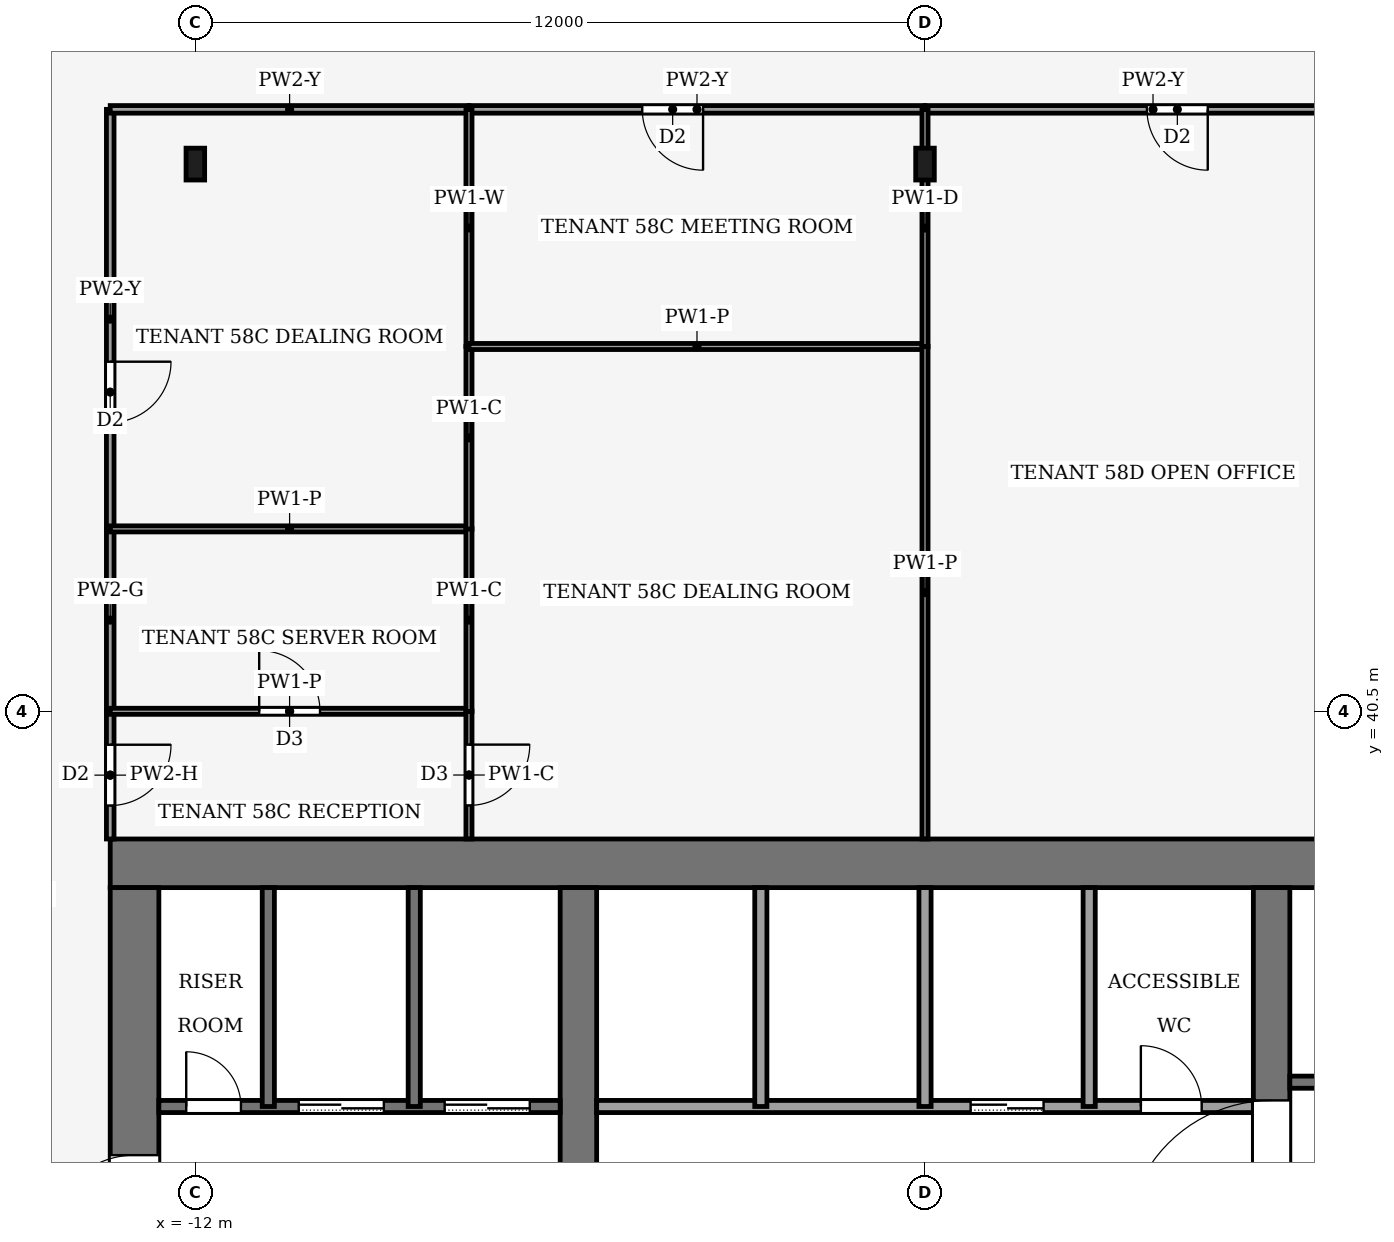
"""IFC4 building model, lengths in metres.
Left out: names, types, materials, properties, quantities, classifications, styles, units other than length and angle.
Written with IfcOpenShell. Run it as: python <this file> out.ifc"""

import sys

from ifc_helpers import new_model, si_unit, direction, frame, frame_2d, origin, origin_2d, place, context, subcontext, project, spatial, rectangle, i_section, extrude, element, fill, save


model = new_model("IFC4")
c1 = context("Model", 3, precision=1e-05, world=origin(), true_north=direction((0.0, 1.0)))
c2 = subcontext(c1, "Body", "Model", "MODEL_VIEW")
j1 = project(units=[si_unit("LENGTHUNIT", "METRE"), si_unit("PLANEANGLEUNIT", "RADIAN")], contexts=[c1])
p1 = place(None, origin())
s1 = spatial("IfcSite", under=j1, at=p1, CompositionType="ELEMENT")
p2 = place(p1, origin())
s2 = spatial("IfcBuilding", under=s1, at=p2, CompositionType="ELEMENT")
p3 = place(p2, frame((0.0, 0.0, 254.0)))
s3 = spatial("IfcBuildingStorey", under=s2, at=p3, CompositionType="ELEMENT", Elevation=254.0)
p4 = place(p3, frame((-13.4, 38.0, -0.13), z_axis=(0.0, 0.0, 1.0), x_axis=(1.0, 0.0, 0.0)))
e1 = element("IfcWall", 1, at=p4, inside=s3, PredefinedType="SHEAR", context=c2, shape_type="SweptSolid", body=[
    extrude(rectangle(XDim=26.8, YDim=0.8, at=frame_2d((13.4, 0.0))), origin(), (0.0, 0.0, 1.0), 4.0),
])
p5 = place(p3, frame((-13.0, 18.4, -0.13), z_axis=(0.0, 0.0, 1.0), x_axis=(0.0, 1.0, 0.0)))
e2 = element("IfcWall", 2, at=p5, inside=s3, PredefinedType="SHEAR", context=c2, shape_type="SweptSolid", body=[
    extrude(rectangle(XDim=19.2, YDim=0.8, at=frame_2d((9.6, 0.0))), origin(), (0.0, 0.0, 1.0), 4.0),
])
p6 = place(p5, frame((2.8, 0.0, 0.13)))
e3 = element("IfcOpeningElement", 3, at=p6, cuts=e2, PredefinedType="OPENING", context=c2, shape_type="SweptSolid", body=[
    extrude(rectangle(XDim=2.4, YDim=2.4, at=frame_2d((1.2, 1.2))), frame((0.0, 0.41, 0.0), z_axis=(0.0, -1.0, 0.0), x_axis=(1.0, 0.0, 0.0)), (0.0, 0.0, 1.0), 0.82),
])
p7 = place(p5, frame((13.4, 0.0, 0.13)))
e4 = element("IfcOpeningElement", 4, at=p7, cuts=e2, PredefinedType="OPENING", context=c2, shape_type="SweptSolid", body=[
    extrude(rectangle(XDim=1.4, YDim=2.2, at=frame_2d((0.7, 1.1))), frame((0.0, 0.41, 0.0), z_axis=(0.0, -1.0, 0.0), x_axis=(1.0, 0.0, 0.0)), (0.0, 0.0, 1.0), 0.82),
])
p8 = place(p3, frame((-5.7, 18.4, -0.13), z_axis=(0.0, 0.0, 1.0), x_axis=(0.0, 1.0, 0.0)))
e5 = element("IfcWall", 5, at=p8, inside=s3, PredefinedType="SHEAR", context=c2, shape_type="SweptSolid", body=[
    extrude(rectangle(XDim=19.2, YDim=0.6, at=frame_2d((9.6, 0.0))), origin(), (0.0, 0.0, 1.0), 4.0),
])
p9 = place(p8, frame((8.35, 0.0, 0.13)))
e6 = element("IfcOpeningElement", 6, at=p9, cuts=e5, PredefinedType="OPENING", context=c2, shape_type="SweptSolid", body=[
    extrude(rectangle(XDim=0.9, YDim=2.1, at=frame_2d((0.45, 1.05))), frame((0.0, 0.31, 0.0), z_axis=(0.0, -1.0, 0.0), x_axis=(1.0, 0.0, 0.0)), (0.0, 0.0, 1.0), 0.62),
])
p10 = place(p3, frame((5.7, 18.4, -0.13), z_axis=(0.0, 0.0, 1.0), x_axis=(0.0, 1.0, 0.0)))
e7 = element("IfcWall", 7, at=p10, inside=s3, PredefinedType="SHEAR", context=c2, shape_type="SweptSolid", body=[
    extrude(rectangle(XDim=19.2, YDim=0.6, at=frame_2d((9.6, 0.0))), origin(), (0.0, 0.0, 1.0), 4.0),
])
p11 = place(p10, frame((13.3, 0.0, 0.13)))
e8 = element("IfcOpeningElement", 8, at=p11, cuts=e7, PredefinedType="OPENING", context=c2, shape_type="SweptSolid", body=[
    extrude(rectangle(XDim=2.4, YDim=2.4, at=frame_2d((1.2, 1.2))), frame((0.0, 0.31, 0.0), z_axis=(0.0, -1.0, 0.0), x_axis=(1.0, 0.0, 0.0)), (0.0, 0.0, 1.0), 0.62),
])
for number, where, z_axis, x_axis in (
    (9, (-12.0, 49.5, 0.0), (0.0, 0.0, 1.0), (1.0, 0.0, 0.0)),
    (10, (0.0, 49.5, 0.0), (0.0, 0.0, 1.0), (1.0, 0.0, 0.0)),
):
    element("IfcColumn", number, at=place(p3, frame(where, z_axis=z_axis, x_axis=x_axis)), inside=s3, PredefinedType="COLUMN", context=c2, shape_type="SweptSolid", body=[
        extrude(i_section(OverallWidth=0.306, OverallDepth=0.524, WebThickness=0.012, FlangeThickness=0.04, FilletRadius=0.027, at=origin_2d()), origin(), (0.0, 0.0, 1.0), 4.0),
    ])
p12 = place(p3, frame((-12.6, 34.0, 0.0), z_axis=(0.0, 0.0, 1.0), x_axis=(1.0, 0.0, 0.0)))
e11 = element("IfcWall", 11, at=p12, inside=s3, PredefinedType="PARTITIONING", context=c2, shape_type="SweptSolid", body=[
    extrude(rectangle(XDim=6.6, YDim=0.2, at=frame_2d((3.3, 0.0))), origin(), (0.0, 0.0, 1.0), 3.87),
])
p13 = place(p12, frame((4.7, 0.0, 0.0)))
e12 = element("IfcOpeningElement", 12, at=p13, cuts=e11, PredefinedType="OPENING", context=c2, shape_type="SweptSolid", body=[
    extrude(rectangle(XDim=1.4, YDim=2.2, at=frame_2d((0.7, 1.1))), frame((0.0, 0.11, 0.0), z_axis=(0.0, -1.0, 0.0), x_axis=(1.0, 0.0, 0.0)), (0.0, 0.0, 1.0), 0.22),
])
p14 = place(p12, frame((2.3, 0.0, 0.0)))
e13 = element("IfcOpeningElement", 13, at=p14, cuts=e11, PredefinedType="OPENING", context=c2, shape_type="SweptSolid", body=[
    extrude(rectangle(XDim=1.4, YDim=2.2, at=frame_2d((0.7, 1.1))), frame((0.0, 0.11, 0.0), z_axis=(0.0, -1.0, 0.0), x_axis=(1.0, 0.0, 0.0)), (0.0, 0.0, 1.0), 0.22),
])
p15 = place(p12, frame((0.45, 0.0, 0.0)))
e14 = element("IfcOpeningElement", 14, at=p15, cuts=e11, PredefinedType="OPENING", context=c2, shape_type="SweptSolid", body=[
    extrude(rectangle(XDim=0.9, YDim=2.1, at=frame_2d((0.45, 1.05))), frame((0.0, 0.11, 0.0), z_axis=(0.0, -1.0, 0.0), x_axis=(1.0, 0.0, 0.0)), (0.0, 0.0, 1.0), 0.22),
])
p16 = place(p3, frame((-5.4, 34.0, 0.0), z_axis=(0.0, 0.0, 1.0), x_axis=(1.0, 0.0, 0.0)))
e15 = element("IfcWall", 15, at=p16, inside=s3, PredefinedType="PARTITIONING", context=c2, shape_type="SweptSolid", body=[
    extrude(rectangle(XDim=10.8, YDim=0.2, at=frame_2d((5.4, 0.0))), origin(), (0.0, 0.0, 1.0), 3.87),
])
p17 = place(p16, frame((6.15, 0.0, 0.0)))
e16 = element("IfcOpeningElement", 16, at=p17, cuts=e15, PredefinedType="OPENING", context=c2, shape_type="SweptSolid", body=[
    extrude(rectangle(XDim=1.2, YDim=2.2, at=frame_2d((0.6, 1.1))), frame((0.0, 0.11, 0.0), z_axis=(0.0, -1.0, 0.0), x_axis=(1.0, 0.0, 0.0)), (0.0, 0.0, 1.0), 0.22),
])
p18 = place(p16, frame((8.95, 0.0, 0.0)))
e17 = element("IfcOpeningElement", 17, at=p18, cuts=e15, PredefinedType="OPENING", context=c2, shape_type="SweptSolid", body=[
    extrude(rectangle(XDim=1.0, YDim=2.1, at=frame_2d((0.5, 1.05))), frame((0.0, 0.11, 0.0), z_axis=(0.0, -1.0, 0.0), x_axis=(1.0, 0.0, 0.0)), (0.0, 0.0, 1.0), 0.22),
])
p19 = place(p3, frame((6.0, 34.4, 0.0), z_axis=(0.0, 0.0, 1.0), x_axis=(1.0, 0.0, 0.0)))
e18 = element("IfcWall", 18, at=p19, inside=s3, PredefinedType="PARTITIONING", context=c2, shape_type="SweptSolid", body=[
    extrude(rectangle(XDim=6.6, YDim=0.2, at=frame_2d((3.3, 0.0))), origin(), (0.0, 0.0, 1.0), 3.87),
])
p20 = place(p19, frame((4.8, 0.0, 0.0)))
e19 = element("IfcOpeningElement", 19, at=p20, cuts=e18, PredefinedType="OPENING", context=c2, shape_type="SweptSolid", body=[
    extrude(rectangle(XDim=1.2, YDim=2.2, at=frame_2d((0.6, 1.1))), frame((0.0, 0.11, 0.0), z_axis=(0.0, -1.0, 0.0), x_axis=(1.0, 0.0, 0.0)), (0.0, 0.0, 1.0), 0.22),
])
for number, where, z_axis, x_axis in (
    (20, (-10.8, 34.0, 0.0), (0.0, 0.0, 1.0), (0.0, 1.0, 0.0)),
    (21, (-8.4, 34.0, 0.0), (0.0, 0.0, 1.0), (0.0, 1.0, 0.0)),
    (22, (-2.7, 34.0, 0.0), (0.0, 0.0, 1.0), (0.0, 1.0, 0.0)),
    (23, (0.0, 34.0, 0.0), (0.0, 0.0, 1.0), (0.0, 1.0, 0.0)),
    (24, (2.7, 34.0, 0.0), (0.0, 0.0, 1.0), (0.0, 1.0, 0.0)),
):
    element("IfcWall", number, at=place(p3, frame(where, z_axis=z_axis, x_axis=x_axis)), inside=s3, PredefinedType="PARTITIONING", context=c2, shape_type="SweptSolid", body=[
        extrude(rectangle(XDim=3.6, YDim=0.2, at=frame_2d((1.8, 0.0))), origin(), (0.0, 0.0, 1.0), 3.87),
    ])
p21 = place(p3, frame((-13.4, 40.5, 0.0), z_axis=(0.0, 0.0, 1.0), x_axis=(0.0, -1.0, 0.0)))
e25 = element("IfcWall", 25, at=p21, inside=s3, PredefinedType="PARTITIONING", context=c2, shape_type="SweptSolid", body=[
    extrude(rectangle(XDim=2.1, YDim=0.125, at=frame_2d((1.05, 0.0))), origin(), (0.0, 0.0, 1.0), 3.14),
])
p22 = place(p21, frame((0.55, 0.0, 0.0)))
e26 = element("IfcOpeningElement", 26, at=p22, cuts=e25, PredefinedType="OPENING", context=c2, shape_type="SweptSolid", body=[
    extrude(rectangle(XDim=1.0, YDim=2.1, at=frame_2d((0.5, 1.05))), frame((0.0, 0.073, 0.0), z_axis=(0.0, -1.0, 0.0), x_axis=(1.0, 0.0, 0.0)), (0.0, 0.0, 1.0), 0.145),
])
p23 = place(p3, frame((-13.4, 40.5, 0.0), z_axis=(0.0, 0.0, 1.0), x_axis=(0.0, 1.0, 0.0)))
e27 = element("IfcWall", 27, at=p23, inside=s3, PredefinedType="PARTITIONING", context=c2, shape_type="SweptSolid", body=[
    extrude(rectangle(XDim=3.0, YDim=0.125, at=frame_2d((1.5, 0.0))), origin(), (0.0, 0.0, 1.0), 3.87),
])
p24 = place(p3, frame((-13.4, 50.4, 0.0), z_axis=(0.0, 0.0, 1.0), x_axis=(0.0, -1.0, 0.0)))
e28 = element("IfcWall", 28, at=p24, inside=s3, PredefinedType="PARTITIONING", context=c2, shape_type="SweptSolid", body=[
    extrude(rectangle(XDim=6.9, YDim=0.125, at=frame_2d((3.45, 0.0))), origin(), (0.0, 0.0, 1.0), 3.24),
])
p25 = place(p24, frame((4.15, 0.0, 0.0)))
e29 = element("IfcOpeningElement", 29, at=p25, cuts=e28, PredefinedType="OPENING", context=c2, shape_type="SweptSolid", body=[
    extrude(rectangle(XDim=1.0, YDim=2.1, at=frame_2d((0.5, 1.05))), frame((0.0, 0.073, 0.0), z_axis=(0.0, -1.0, 0.0), x_axis=(1.0, 0.0, 0.0)), (0.0, 0.0, 1.0), 0.145),
])
p26 = place(p3, frame((-7.5, 50.4, 0.0), z_axis=(0.0, 0.0, 1.0), x_axis=(-1.0, 0.0, 0.0)))
e30 = element("IfcWall", 30, at=p26, inside=s3, PredefinedType="PARTITIONING", context=c2, shape_type="SweptSolid", body=[
    extrude(rectangle(XDim=5.9, YDim=0.125, at=frame_2d((2.95, 0.0))), origin(), (0.0, 0.0, 1.0), 3.24),
])
p27 = place(p3, frame((0.0, 50.4, 0.0), z_axis=(0.0, 0.0, 1.0), x_axis=(-1.0, 0.0, 0.0)))
e31 = element("IfcWall", 31, at=p27, inside=s3, PredefinedType="PARTITIONING", context=c2, shape_type="SweptSolid", body=[
    extrude(rectangle(XDim=7.5, YDim=0.125, at=frame_2d((3.75, 0.0))), origin(), (0.0, 0.0, 1.0), 3.24),
])
p28 = place(p27, frame((3.65, 0.0, 0.0)))
e32 = element("IfcOpeningElement", 32, at=p28, cuts=e31, PredefinedType="OPENING", context=c2, shape_type="SweptSolid", body=[
    extrude(rectangle(XDim=1.0, YDim=2.1, at=frame_2d((0.5, 1.05))), frame((0.0, 0.073, 0.0), z_axis=(0.0, -1.0, 0.0), x_axis=(1.0, 0.0, 0.0)), (0.0, 0.0, 1.0), 0.145),
])
p29 = place(p3, frame((7.5, 50.4, 0.0), z_axis=(0.0, 0.0, 1.0), x_axis=(-1.0, 0.0, 0.0)))
e33 = element("IfcWall", 33, at=p29, inside=s3, PredefinedType="PARTITIONING", context=c2, shape_type="SweptSolid", body=[
    extrude(rectangle(XDim=7.5, YDim=0.125, at=frame_2d((3.75, 0.0))), origin(), (0.0, 0.0, 1.0), 3.24),
])
p30 = place(p29, frame((2.85, 0.0, 0.0)))
e34 = element("IfcOpeningElement", 34, at=p30, cuts=e33, PredefinedType="OPENING", context=c2, shape_type="SweptSolid", body=[
    extrude(rectangle(XDim=1.0, YDim=2.1, at=frame_2d((0.5, 1.05))), frame((0.0, 0.073, 0.0), z_axis=(0.0, -1.0, 0.0), x_axis=(1.0, 0.0, 0.0)), (0.0, 0.0, 1.0), 0.145),
])
p31 = place(p3, frame((-13.4, 40.5, 0.0), z_axis=(0.0, 0.0, 1.0), x_axis=(1.0, 0.0, 0.0)))
e35 = element("IfcWall", 35, at=p31, inside=s3, PredefinedType="PARTITIONING", context=c2, shape_type="SweptSolid", body=[
    extrude(rectangle(XDim=5.9, YDim=0.1, at=frame_2d((2.95, 0.0))), origin(), (0.0, 0.0, 1.0), 3.44),
])
p32 = place(p31, frame((2.45, 0.0, 0.0)))
e36 = element("IfcOpeningElement", 36, at=p32, cuts=e35, PredefinedType="OPENING", context=c2, shape_type="SweptSolid", body=[
    extrude(rectangle(XDim=1.0, YDim=2.1, at=frame_2d((0.5, 1.05))), frame((0.0, 0.06, 0.0), z_axis=(0.0, -1.0, 0.0), x_axis=(1.0, 0.0, 0.0)), (0.0, 0.0, 1.0), 0.12),
])
p33 = place(p3, frame((-7.5, 40.504, 0.0), z_axis=(0.0, 0.0, 1.0), x_axis=(0.0, -1.0, 0.0)))
e37 = element("IfcWall", 37, at=p33, inside=s3, PredefinedType="PARTITIONING", context=c2, shape_type="SweptSolid", body=[
    extrude(rectangle(XDim=2.104, YDim=0.1, at=frame_2d((1.052, 0.0))), origin(), (0.0, 0.0, 1.0), 3.87),
])
p34 = place(p33, frame((0.552, 0.0, 0.0)))
e38 = element("IfcOpeningElement", 38, at=p34, cuts=e37, PredefinedType="OPENING", context=c2, shape_type="SweptSolid", body=[
    extrude(rectangle(XDim=1.0, YDim=2.1, at=frame_2d((0.5, 1.05))), frame((0.0, 0.06, 0.0), z_axis=(0.0, -1.0, 0.0), x_axis=(1.0, 0.0, 0.0)), (0.0, 0.0, 1.0), 0.12),
])
p35 = place(p3, frame((-7.5, 43.5, 0.0), z_axis=(0.0, 0.0, 1.0), x_axis=(-1.0, 0.0, 0.0)))
e39 = element("IfcWall", 39, at=p35, inside=s3, PredefinedType="PARTITIONING", context=c2, shape_type="SweptSolid", body=[
    extrude(rectangle(XDim=5.9, YDim=0.1, at=frame_2d((2.95, 0.0))), origin(), (0.0, 0.0, 1.0), 3.44),
])
p36 = place(p3, frame((-7.5, 40.496, 0.0), z_axis=(0.0, 0.0, 1.0), x_axis=(0.0, 1.0, 0.0)))
e40 = element("IfcWall", 40, at=p36, inside=s3, PredefinedType="PARTITIONING", context=c2, shape_type="SweptSolid", body=[
    extrude(rectangle(XDim=3.008, YDim=0.1, at=frame_2d((1.504, 0.0))), origin(), (0.0, 0.0, 1.0), 3.87),
])
p37 = place(p3, frame((-7.5, 43.496, 0.0), z_axis=(0.0, 0.0, 1.0), x_axis=(0.0, 1.0, 0.0)))
e41 = element("IfcWall", 41, at=p37, inside=s3, PredefinedType="PARTITIONING", context=c2, shape_type="SweptSolid", body=[
    extrude(rectangle(XDim=3.004, YDim=0.1, at=frame_2d((1.502, 0.0))), origin(), (0.0, 0.0, 1.0), 3.87),
])
p38 = place(p3, frame((-7.5, 46.5, 0.0), z_axis=(0.0, 0.0, 1.0), x_axis=(0.0, 1.0, 0.0)))
e42 = element("IfcWall", 42, at=p38, inside=s3, PredefinedType="PARTITIONING", context=c2, shape_type="SweptSolid", body=[
    extrude(rectangle(XDim=3.9, YDim=0.1, at=frame_2d((1.95, 0.0))), origin(), (0.0, 0.0, 1.0), 3.24),
])
p39 = place(p3, frame((0.0, 46.5, 0.0), z_axis=(0.0, 0.0, 1.0), x_axis=(-1.0, 0.0, 0.0)))
e43 = element("IfcWall", 43, at=p39, inside=s3, PredefinedType="PARTITIONING", context=c2, shape_type="SweptSolid", body=[
    extrude(rectangle(XDim=7.5, YDim=0.1, at=frame_2d((3.75, 0.0))), origin(), (0.0, 0.0, 1.0), 3.44),
])
p40 = place(p3, frame((0.0, 38.4, 0.0), z_axis=(0.0, 0.0, 1.0), x_axis=(0.0, 1.0, 0.0)))
e44 = element("IfcWall", 44, at=p40, inside=s3, PredefinedType="PARTITIONING", context=c2, shape_type="SweptSolid", body=[
    extrude(rectangle(XDim=8.104, YDim=0.1, at=frame_2d((4.052, 0.0))), origin(), (0.0, 0.0, 1.0), 3.44),
])
p41 = place(p3, frame((0.0, 46.496, 0.0), z_axis=(0.0, 0.0, 1.0), x_axis=(0.0, 1.0, 0.0)))
e45 = element("IfcWall", 45, at=p41, inside=s3, PredefinedType="PARTITIONING", context=c2, shape_type="SweptSolid", body=[
    extrude(rectangle(XDim=3.904, YDim=0.1, at=frame_2d((1.952, 0.0))), origin(), (0.0, 0.0, 1.0), 3.29),
])
p42 = place(p17, origin())
e46 = element("IfcDoor", 46, at=p42, inside=s3, OperationType="SLIDING_TO_LEFT", PredefinedType="DOOR", context=c2, shape_type="SweptSolid", body=[
    extrude(rectangle(XDim=1.2, YDim=2.2, at=frame_2d((0.6, 1.1))), frame((0.0, 0.025, 0.0), z_axis=(0.0, -1.0, 0.0), x_axis=(1.0, 0.0, 0.0)), (0.0, 0.0, 1.0), 0.05),
])
fill(e16, e46)
p43 = place(p13, origin())
e47 = element("IfcDoor", 47, at=p43, inside=s3, OperationType="SLIDING_TO_LEFT", PredefinedType="DOOR", context=c2, shape_type="SweptSolid", body=[
    extrude(rectangle(XDim=1.4, YDim=2.2, at=frame_2d((0.7, 1.1))), frame((0.0, 0.025, 0.0), z_axis=(0.0, -1.0, 0.0), x_axis=(1.0, 0.0, 0.0)), (0.0, 0.0, 1.0), 0.05),
])
fill(e12, e47)
p44 = place(p14, origin())
e48 = element("IfcDoor", 48, at=p44, inside=s3, OperationType="SLIDING_TO_LEFT", PredefinedType="DOOR", context=c2, shape_type="SweptSolid", body=[
    extrude(rectangle(XDim=1.4, YDim=2.2, at=frame_2d((0.7, 1.1))), frame((0.0, 0.025, 0.0), z_axis=(0.0, -1.0, 0.0), x_axis=(1.0, 0.0, 0.0)), (0.0, 0.0, 1.0), 0.05),
])
fill(e13, e48)
p45 = place(p15, origin())
e49 = element("IfcDoor", 49, at=p45, inside=s3, OperationType="SINGLE_SWING_RIGHT", PredefinedType="DOOR", context=c2, shape_type="SweptSolid", body=[
    extrude(rectangle(XDim=0.9, YDim=2.1, at=frame_2d((0.45, 1.05))), frame((0.0, 0.025, 0.0), z_axis=(0.0, -1.0, 0.0), x_axis=(1.0, 0.0, 0.0)), (0.0, 0.0, 1.0), 0.05),
])
fill(e14, e49)
p46 = place(p18, origin())
e50 = element("IfcDoor", 50, at=p46, inside=s3, OperationType="SINGLE_SWING_LEFT", PredefinedType="DOOR", context=c2, shape_type="SweptSolid", body=[
    extrude(rectangle(XDim=1.0, YDim=2.1, at=frame_2d((0.5, 1.05))), frame((0.0, 0.025, 0.0), z_axis=(0.0, -1.0, 0.0), x_axis=(1.0, 0.0, 0.0)), (0.0, 0.0, 1.0), 0.05),
])
fill(e17, e50)
p47 = place(p11, origin())
e51 = element("IfcDoor", 51, at=p47, inside=s3, OperationType="DOUBLE_DOOR_SINGLE_SWING", PredefinedType="DOOR", context=c2, shape_type="SweptSolid", body=[
    extrude(rectangle(XDim=2.4, YDim=2.4, at=frame_2d((1.2, 1.2))), frame((0.0, 0.025, 0.0), z_axis=(0.0, -1.0, 0.0), x_axis=(1.0, 0.0, 0.0)), (0.0, 0.0, 1.0), 0.05),
])
fill(e8, e51)
p48 = place(p7, origin())
e52 = element("IfcDoor", 52, at=p48, inside=s3, OperationType="SINGLE_SWING_RIGHT", PredefinedType="DOOR", context=c2, shape_type="SweptSolid", body=[
    extrude(rectangle(XDim=1.4, YDim=2.2, at=frame_2d((0.7, 1.1))), frame((0.0, 0.025, 0.0), z_axis=(0.0, -1.0, 0.0), x_axis=(1.0, 0.0, 0.0)), (0.0, 0.0, 1.0), 0.05),
])
fill(e4, e52)
p49 = place(p22, origin())
e53 = element("IfcDoor", 53, at=p49, inside=s3, OperationType="SINGLE_SWING_RIGHT", PredefinedType="DOOR", context=c2, shape_type="SweptSolid", body=[
    extrude(rectangle(XDim=1.0, YDim=2.1, at=frame_2d((0.5, 1.05))), frame((0.0, 0.025, 0.0), z_axis=(0.0, -1.0, 0.0), x_axis=(1.0, 0.0, 0.0)), (0.0, 0.0, 1.0), 0.05),
])
fill(e26, e53)
p50 = place(p25, origin())
e54 = element("IfcDoor", 54, at=p50, inside=s3, OperationType="SINGLE_SWING_RIGHT", PredefinedType="DOOR", context=c2, shape_type="SweptSolid", body=[
    extrude(rectangle(XDim=1.0, YDim=2.1, at=frame_2d((0.5, 1.05))), frame((0.0, 0.025, 0.0), z_axis=(0.0, -1.0, 0.0), x_axis=(1.0, 0.0, 0.0)), (0.0, 0.0, 1.0), 0.05),
])
fill(e29, e54)
p51 = place(p28, origin())
e55 = element("IfcDoor", 55, at=p51, inside=s3, OperationType="SINGLE_SWING_RIGHT", PredefinedType="DOOR", context=c2, shape_type="SweptSolid", body=[
    extrude(rectangle(XDim=1.0, YDim=2.1, at=frame_2d((0.5, 1.05))), frame((0.0, 0.025, 0.0), z_axis=(0.0, -1.0, 0.0), x_axis=(1.0, 0.0, 0.0)), (0.0, 0.0, 1.0), 0.05),
])
fill(e32, e55)
p52 = place(p30, origin())
e56 = element("IfcDoor", 56, at=p52, inside=s3, OperationType="SINGLE_SWING_LEFT", PredefinedType="DOOR", context=c2, shape_type="SweptSolid", body=[
    extrude(rectangle(XDim=1.0, YDim=2.1, at=frame_2d((0.5, 1.05))), frame((0.0, 0.025, 0.0), z_axis=(0.0, -1.0, 0.0), x_axis=(1.0, 0.0, 0.0)), (0.0, 0.0, 1.0), 0.05),
])
fill(e34, e56)
p53 = place(p32, origin())
e57 = element("IfcDoor", 57, at=p53, inside=s3, OperationType="SINGLE_SWING_LEFT", PredefinedType="DOOR", context=c2, shape_type="SweptSolid", body=[
    extrude(rectangle(XDim=1.0, YDim=2.1, at=frame_2d((0.5, 1.05))), frame((0.0, 0.025, 0.0), z_axis=(0.0, -1.0, 0.0), x_axis=(1.0, 0.0, 0.0)), (0.0, 0.0, 1.0), 0.05),
])
fill(e36, e57)
p54 = place(p34, origin())
e58 = element("IfcDoor", 58, at=p54, inside=s3, OperationType="SINGLE_SWING_RIGHT", PredefinedType="DOOR", context=c2, shape_type="SweptSolid", body=[
    extrude(rectangle(XDim=1.0, YDim=2.1, at=frame_2d((0.5, 1.05))), frame((0.0, 0.025, 0.0), z_axis=(0.0, -1.0, 0.0), x_axis=(1.0, 0.0, 0.0)), (0.0, 0.0, 1.0), 0.05),
])
fill(e38, e58)
save(model, sys.argv[1])
